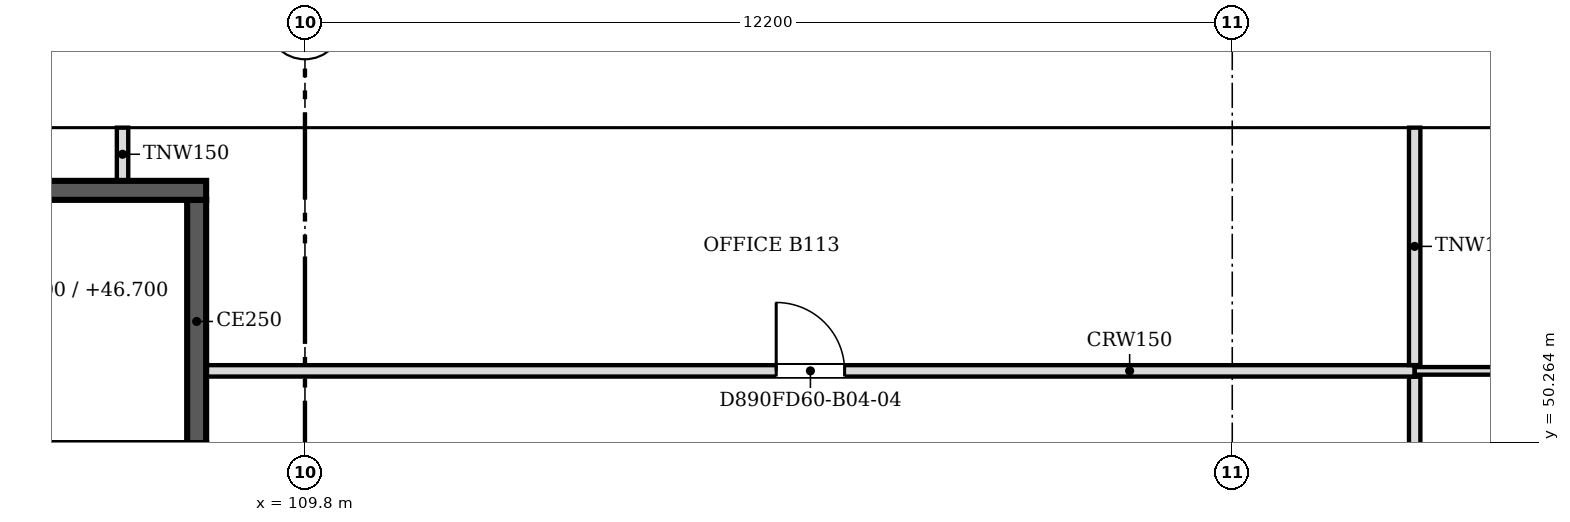
"""IFC4 building model, lengths in metres.
Left out: names, types, materials, properties, quantities, classifications, styles, units other than length and angle.
Written with IfcOpenShell. Run it as: python <this file> out.ifc"""

import sys

from ifc_helpers import new_model, si_unit, direction, frame, frame_2d, origin, place, context, subcontext, project, spatial, polyline, rectangle, outline, extrude, faceted_brep, source, transform, mapped, element, fill, save


model = new_model("IFC4")
c1 = context("Model", 3, precision=1e-05, world=origin(), true_north=direction((0.0, 1.0)))
c2 = subcontext(c1, "Body", "Model", "MODEL_VIEW")
j1 = project(units=[si_unit("LENGTHUNIT", "METRE"), si_unit("PLANEANGLEUNIT", "RADIAN")], contexts=[c1])
p1 = place(None, origin())
s1 = spatial("IfcSite", under=j1, at=p1, CompositionType="ELEMENT")
p2 = place(p1, origin())
s2 = spatial("IfcBuilding", under=s1, at=p2, CompositionType="ELEMENT")
p3 = place(p2, frame((0.0, 0.0, 41.0)))
s3 = spatial("IfcBuildingStorey", under=s2, at=p3, CompositionType="ELEMENT", Elevation=41.0)
m1 = source(origin(), c2, "Body", "Brep", [
    faceted_brep([(0.047, -0.25, 0.0), (3.05, -0.25, 3.8), (0.047, -0.25, 7.6), (0.0, -0.25, 7.54), (0.0, -0.25, 0.06), (0.093, 0.25, 7.541), (3.05, 0.25, 3.8), (0.093, 0.25, 0.059), (0.047, 0.0, 0.0), (0.047, 0.0, 7.6)], [[[0, 1, 2, 3, 4]], [[5, 6, 7]], [[7, 6, 1, 0, 8]], [[6, 5, 9, 2, 1]], [[3, 2, 9]], [[8, 0, 4]], [[7, 8, 4, 3, 9, 5]]]),
])
p4 = place(p3, frame((128.1, 54.65, -3.8), z_axis=(0.0, 0.0, 1.0), x_axis=(-1.0, 0.0, 0.0)))
e1 = element("IfcWall", 1, at=p4, inside=s3, PredefinedType="SOLIDWALL", context=c2, shape_type="MappedRepresentation", body=[
    mapped(m1, transform((0.0, 0.0, 0.0), scale=1.0)),
])
m2 = source(origin(), c2, "Body", "SweptSolid", [
    extrude(outline(polyline([(0.247, 0.656), (2.731, 3.8), (0.247, 6.944), (0.247, 0.656)])), frame((0.0, 0.26, 0.0), z_axis=(0.0, -1.0, 0.0), x_axis=(1.0, 0.0, 0.0)), (0.0, 0.0, 1.0), 0.52),
])
p5 = place(p4, origin())
e2 = element("IfcOpeningElement", 2, at=p5, cuts=e1, PredefinedType="OPENING", context=c2, shape_type="MappedRepresentation", body=[
    mapped(m2, transform((0.0, 0.0, 0.0), scale=1.0)),
])
m3 = source(origin(), c2, "Body", "SweptSolid", [
    extrude(outline(polyline([(3.05, 0.0), (6.1, 3.8), (3.05, 7.6), (0.0, 3.8), (3.05, 0.0)])), frame((0.0, 0.25, 0.0), z_axis=(0.0, -1.0, 0.0), x_axis=(1.0, 0.0, 0.0)), (0.0, 0.0, 1.0), 0.5),
])
p6 = place(p3, frame((125.05, 54.65, -3.8), z_axis=(0.0, 0.0, 1.0), x_axis=(-1.0, 0.0, 0.0)))
e3 = element("IfcWall", 3, at=p6, inside=s3, PredefinedType="SOLIDWALL", context=c2, shape_type="MappedRepresentation", body=[
    mapped(m3, transform((0.0, 0.0, 0.0), scale=1.0)),
])
m4 = source(origin(), c2, "Body", "SweptSolid", [
    extrude(outline(polyline([(3.05, 0.399), (5.78, 3.8), (3.05, 7.201), (0.321, 3.8), (3.05, 0.399)])), frame((0.0, 0.26, 0.0), z_axis=(0.0, -1.0, 0.0), x_axis=(1.0, 0.0, 0.0)), (0.0, 0.0, 1.0), 0.52),
])
p7 = place(p6, origin())
e4 = element("IfcOpeningElement", 4, at=p7, cuts=e3, PredefinedType="OPENING", context=c2, shape_type="MappedRepresentation", body=[
    mapped(m4, transform((0.0, 0.0, 0.0), scale=1.0)),
])
m5 = source(origin(), c2, "Body", "Brep", [
    faceted_brep([(3.05, -0.25, 0.0), (6.1, -0.25, 3.8), (6.1, -0.25, 3.8), (3.05, -0.25, 7.6), (0.0, -0.25, 3.8), (0.0, 0.25, 3.8), (3.05, 0.25, 7.6), (6.1, 0.25, 3.8), (6.1, 0.25, 3.8), (3.05, 0.25, 0.0)], [[[0, 1, 2, 3, 4]], [[5, 6, 7, 8, 9]], [[9, 8, 1, 0]], [[7, 6, 3, 2]], [[6, 5, 4, 3]], [[5, 9, 0, 4]], [[1, 8, 7, 2]]]),
])
p8 = place(p3, frame((118.95, 54.65, -3.8), z_axis=(0.0, 0.0, 1.0), x_axis=(-1.0, 0.0, 0.0)))
e5 = element("IfcWall", 5, at=p8, inside=s3, PredefinedType="SOLIDWALL", context=c2, shape_type="MappedRepresentation", body=[
    mapped(m5, transform((0.0, 0.0, 0.0), scale=1.0)),
])
p9 = place(p8, origin())
e6 = element("IfcOpeningElement", 6, at=p9, cuts=e5, PredefinedType="OPENING", context=c2, shape_type="MappedRepresentation", body=[
    mapped(m4, transform((0.0, 0.0, 0.0), scale=1.0)),
])
p10 = place(p3, frame((112.85, 54.65, -3.8), z_axis=(0.0, 0.0, 1.0), x_axis=(-1.0, 0.0, 0.0)))
e7 = element("IfcWall", 7, at=p10, inside=s3, PredefinedType="SOLIDWALL", context=c2, shape_type="MappedRepresentation", body=[
    mapped(m3, transform((0.0, 0.0, 0.0), scale=1.0)),
])
p11 = place(p10, origin())
e8 = element("IfcOpeningElement", 8, at=p11, cuts=e7, PredefinedType="OPENING", context=c2, shape_type="MappedRepresentation", body=[
    mapped(m4, transform((0.0, 0.0, 0.0), scale=1.0)),
])
p12 = place(p3, frame((106.75, 54.65, -3.8), z_axis=(0.0, 0.0, 1.0), x_axis=(-1.0, 0.0, 0.0)))
e9 = element("IfcWall", 9, at=p12, inside=s3, PredefinedType="SOLIDWALL", context=c2, shape_type="MappedRepresentation", body=[
    mapped(m3, transform((0.0, 0.0, 0.0), scale=1.0)),
])
p13 = place(p12, origin())
e10 = element("IfcOpeningElement", 10, at=p13, cuts=e9, PredefinedType="OPENING", context=c2, shape_type="MappedRepresentation", body=[
    mapped(m4, transform((0.0, 0.0, 0.0), scale=1.0)),
])
p14 = place(p2, frame((0.0, 0.0, 44.8)))
s4 = spatial("IfcBuildingStorey", under=s2, at=p14, CompositionType="ELEMENT", Elevation=44.8)
m6 = source(origin(), c2, "Body", "Brep", [
    faceted_brep([(3.003, -0.25, 0.0), (6.053, -0.25, 3.8), (3.003, -0.25, 7.6), (0.0, -0.25, 3.8), (0.047, 0.25, 3.859), (3.003, 0.25, 7.6), (6.053, 0.25, 3.8), (3.003, 0.25, 0.0), (0.047, 0.25, 3.741), (0.0, 0.0, 3.8)], [[[0, 1, 2, 3]], [[4, 5, 6, 7, 8]], [[7, 6, 1, 0]], [[6, 5, 2, 1]], [[5, 4, 9, 3, 2]], [[8, 7, 0, 3, 9]], [[8, 9, 4]]]),
])
p15 = place(p14, frame((128.053, 54.65, -3.8), z_axis=(0.0, 0.0, 1.0), x_axis=(-1.0, 0.0, 0.0)))
e11 = element("IfcWall", 11, at=p15, inside=s4, PredefinedType="SOLIDWALL", context=c2, shape_type="MappedRepresentation", body=[
    mapped(m6, transform((0.0, 0.0, 0.0), scale=1.0)),
])
m7 = source(origin(), c2, "Body", "SweptSolid", [
    extrude(outline(polyline([(3.005, 0.401), (5.733, 3.8), (3.005, 7.199), (0.319, 3.8), (3.005, 0.401)])), frame((0.0, 0.26, 0.0), z_axis=(0.0, -1.0, 0.0), x_axis=(1.0, 0.0, 0.0)), (0.0, 0.0, 1.0), 0.52),
])
p16 = place(p15, origin())
e12 = element("IfcOpeningElement", 12, at=p16, cuts=e11, PredefinedType="OPENING", context=c2, shape_type="MappedRepresentation", body=[
    mapped(m7, transform((0.0, 0.0, 0.0), scale=1.0)),
])
p17 = place(p14, frame((122.0, 54.65, -3.8), z_axis=(0.0, 0.0, 1.0), x_axis=(-1.0, 0.0, 0.0)))
e13 = element("IfcWall", 13, at=p17, inside=s4, PredefinedType="SOLIDWALL", context=c2, shape_type="MappedRepresentation", body=[
    mapped(m3, transform((0.0, 0.0, 0.0), scale=1.0)),
])
p18 = place(p17, origin())
e14 = element("IfcOpeningElement", 14, at=p18, cuts=e13, PredefinedType="OPENING", context=c2, shape_type="MappedRepresentation", body=[
    mapped(m4, transform((0.0, 0.0, 0.0), scale=1.0)),
])
p19 = place(p14, frame((115.9, 54.65, -3.8), z_axis=(0.0, 0.0, 1.0), x_axis=(-1.0, 0.0, 0.0)))
e15 = element("IfcWall", 15, at=p19, inside=s4, PredefinedType="SOLIDWALL", context=c2, shape_type="MappedRepresentation", body=[
    mapped(m5, transform((0.0, 0.0, 0.0), scale=1.0)),
])
p20 = place(p19, origin())
e16 = element("IfcOpeningElement", 16, at=p20, cuts=e15, PredefinedType="OPENING", context=c2, shape_type="MappedRepresentation", body=[
    mapped(m4, transform((0.0, 0.0, 0.0), scale=1.0)),
])
p21 = place(p14, frame((109.8, 54.65, -3.8), z_axis=(0.0, 0.0, 1.0), x_axis=(-1.0, 0.0, 0.0)))
e17 = element("IfcWall", 17, at=p21, inside=s4, PredefinedType="SOLIDWALL", context=c2, shape_type="MappedRepresentation", body=[
    mapped(m3, transform((0.0, 0.0, 0.0), scale=1.0)),
])
p22 = place(p21, origin())
e18 = element("IfcOpeningElement", 18, at=p22, cuts=e17, PredefinedType="OPENING", context=c2, shape_type="MappedRepresentation", body=[
    mapped(m4, transform((0.0, 0.0, 0.0), scale=1.0)),
])
p23 = place(p3, frame((100.0, 53.575, 0.0), z_axis=(0.0, 0.0, 1.0), x_axis=(1.0, 0.0, 0.0)))
e19 = element("IfcWall", 19, at=p23, inside=s3, PredefinedType="SOLIDWALL", context=c2, shape_type="SweptSolid", body=[
    extrude(rectangle(XDim=8.5, YDim=0.25, at=frame_2d((4.25, 0.0))), origin(), (0.0, 0.0, 1.0), 3.8),
])
p24 = place(p3, frame((108.375, 53.45, 0.0), z_axis=(0.0, 0.0, 1.0), x_axis=(0.0, -1.0, 0.0)))
e20 = element("IfcWall", 20, at=p24, inside=s3, PredefinedType="SOLIDWALL", context=c2, shape_type="SweptSolid", body=[
    extrude(rectangle(XDim=3.2, YDim=0.25, at=frame_2d((1.6, 0.0))), origin(), (0.0, 0.0, 1.0), 3.8),
])
p25 = place(p3, frame((124.4, 51.124, 0.0), z_axis=(0.0, 0.0, 1.0), x_axis=(0.0, -1.0, 0.0)))
e21 = element("IfcWall", 21, at=p25, inside=s3, PredefinedType="PARTITIONING", context=c2, shape_type="SweptSolid", body=[
    extrude(rectangle(XDim=14.524, YDim=0.15, at=frame_2d((7.262, 0.0))), origin(), (0.0, 0.0, 1.0), 3.067),
])
m8 = source(origin(), c2, "Body", "SweptSolid", [
    extrude(rectangle(XDim=1.0, YDim=2.1, at=frame_2d((0.5, 1.05))), frame((0.0, 0.085, 0.0), z_axis=(0.0, -1.0, 0.0), x_axis=(1.0, 0.0, 0.0)), (0.0, 0.0, 1.0), 0.17),
])
p26 = place(p25, frame((3.724, 0.0, 0.0)))
e22 = element("IfcOpeningElement", 22, at=p26, cuts=e21, PredefinedType="OPENING", context=c2, shape_type="MappedRepresentation", body=[
    mapped(m8, transform((0.0, 0.0, 0.0), scale=1.0)),
])
p27 = place(p25, frame((11.024, 0.0, 0.0)))
e23 = element("IfcOpeningElement", 23, at=p27, cuts=e21, PredefinedType="OPENING", context=c2, shape_type="MappedRepresentation", body=[
    mapped(m8, transform((0.0, 0.0, 0.0), scale=1.0)),
])
p28 = place(p3, frame((108.5, 51.2, 0.0), z_axis=(0.0, 0.0, 1.0), x_axis=(1.0, 0.0, 0.0)))
e24 = element("IfcWall", 24, at=p28, inside=s3, PredefinedType="PARTITIONING", context=c2, shape_type="SweptSolid", body=[
    extrude(rectangle(XDim=15.9, YDim=0.15, at=frame_2d((7.95, 0.0))), origin(), (0.0, 0.0, 1.0), 3.067),
])
m9 = source(origin(), c2, "Body", "SweptSolid", [
    extrude(rectangle(XDim=0.9, YDim=2.1, at=frame_2d((0.45, 1.05))), frame((0.0, 0.085, 0.0), z_axis=(0.0, -1.0, 0.0), x_axis=(1.0, 0.0, 0.0)), (0.0, 0.0, 1.0), 0.17),
])
p29 = place(p28, frame((7.5, 0.0, 0.0)))
e25 = element("IfcOpeningElement", 25, at=p29, cuts=e24, PredefinedType="OPENING", context=c2, shape_type="MappedRepresentation", body=[
    mapped(m9, transform((0.0, 0.0, 0.0), scale=1.0)),
])
p30 = place(p3, frame((124.401, 51.2, 0.0), z_axis=(0.0, 0.0, 1.0), x_axis=(1.0, 0.0, 0.0)))
e26 = element("IfcWall", 26, at=p30, inside=s3, PredefinedType="PARTITIONING", context=c2, shape_type="SweptSolid", body=[
    extrude(rectangle(XDim=4.548, YDim=0.1, at=frame_2d((2.274, 0.0))), origin(), (0.0, 0.0, 1.0), 3.067),
])
p31 = place(p3, frame((124.4, 51.276, 0.0), z_axis=(0.0, 0.0, 1.0), x_axis=(0.0, 1.0, 0.0)))
e27 = element("IfcWall", 27, at=p31, inside=s3, PredefinedType="PARTITIONING", context=c2, shape_type="SweptSolid", body=[
    extrude(rectangle(XDim=3.124, YDim=0.15, at=frame_2d((1.562, 0.0))), origin(), (0.0, 0.0, 1.0), 3.067),
])
p32 = place(p3, frame((107.4, 53.7, 0.0), z_axis=(0.0, 0.0, 1.0), x_axis=(0.0, 1.0, 0.0)))
e28 = element("IfcWall", 28, at=p32, inside=s3, PredefinedType="PARTITIONING", context=c2, shape_type="SweptSolid", body=[
    extrude(rectangle(XDim=0.7, YDim=0.15, at=frame_2d((0.35, 0.0))), origin(), (0.0, 0.0, 1.0), 3.067),
])
m10 = source(origin(), c2, "Body", "SweptSolid", [
    extrude(rectangle(XDim=0.9, YDim=2.1, at=frame_2d((0.45, 1.05))), frame((0.0, 0.025, 0.0), z_axis=(0.0, -1.0, 0.0), x_axis=(1.0, 0.0, 0.0)), (0.0, 0.0, 1.0), 0.05),
])
p33 = place(p29, origin())
e29 = element("IfcDoor", 29, at=p33, inside=s3, OperationType="SINGLE_SWING_LEFT", PredefinedType="DOOR", context=c2, shape_type="MappedRepresentation", body=[
    mapped(m10, transform((0.0, 0.0, 0.0), scale=1.0)),
])
fill(e25, e29)
save(model, sys.argv[1])
